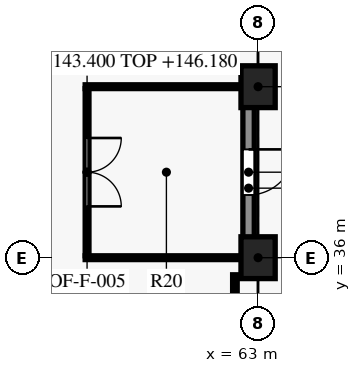
"""IFC4 building model, lengths in metres.
Left out: names, types, materials, properties, quantities, classifications, styles, units other than length and angle.
Written with IfcOpenShell. Run it as: python <this file> out.ifc"""

import sys

from ifc_helpers import new_model, si_unit, direction, frame, frame_2d, origin, origin_2d, place, context, subcontext, project, spatial, rectangle, extrude, element, fill, save


model = new_model("IFC4")
c1 = context("Model", 3, precision=1e-05, world=origin(), true_north=direction((0.0, 1.0)))
c2 = subcontext(c1, "Body", "Model", "MODEL_VIEW")
j1 = project(units=[si_unit("LENGTHUNIT", "METRE"), si_unit("PLANEANGLEUNIT", "RADIAN")], contexts=[c1])
p1 = place(None, origin())
s1 = spatial("IfcSite", under=j1, at=p1, CompositionType="ELEMENT")
p2 = place(p1, origin())
s2 = spatial("IfcBuilding", under=s1, at=p2, CompositionType="ELEMENT")
p3 = place(p2, frame((0.0, 0.0, 143.4)))
s3 = spatial("IfcBuildingStorey", under=s2, at=p3, CompositionType="ELEMENT", Elevation=143.4)
for number, where, z_axis, x_axis in (
    (1, (63.0, 36.0, -0.3), (0.0, 0.0, 1.0), (0.0, 1.0, 0.0)),
    (2, (63.0, 40.5, -0.3), (0.0, 0.0, 1.0), (0.0, 1.0, 0.0)),
):
    element("IfcColumn", number, at=place(p3, frame(where, z_axis=z_axis, x_axis=x_axis)), inside=s3, PredefinedType="COLUMN", context=c2, shape_type="SweptSolid", body=[
        extrude(rectangle(XDim=0.9, YDim=1.1, at=origin_2d()), origin(), (0.0, 0.0, 1.0), 4.1),
    ])
p4 = place(p3, frame((62.75, 40.05, 0.0), z_axis=(0.0, 0.0, 1.0), x_axis=(0.0, -1.0, 0.0)))
e3 = element("IfcWall", 3, at=p4, inside=s3, PredefinedType="SOLIDWALL", context=c2, shape_type="SweptSolid", body=[
    extrude(rectangle(XDim=3.6, YDim=0.3, at=frame_2d((1.8, 0.0))), origin(), (0.0, 0.0, 1.0), 3.15),
])
p5 = place(p4, frame((1.2, 0.0, 0.0)))
e4 = element("IfcOpeningElement", 4, at=p5, cuts=e3, PredefinedType="OPENING", context=c2, shape_type="SweptSolid", body=[
    extrude(rectangle(XDim=1.2, YDim=2.5, at=frame_2d((0.6, 1.25))), frame((0.0, 0.16, 0.0), z_axis=(0.0, -1.0, 0.0), x_axis=(1.0, 0.0, 0.0)), (0.0, 0.0, 1.0), 0.32),
])
p6 = place(p3, frame((62.43, 36.0, 0.0), z_axis=(0.0, 0.0, 1.0), x_axis=(-1.0, 0.0, 0.0)))
e5 = element("IfcWall", 5, at=p6, inside=s3, PredefinedType="PARTITIONING", context=c2, shape_type="SweptSolid", body=[
    extrude(rectangle(XDim=3.98, YDim=0.1, at=frame_2d((1.99, 0.0))), origin(), (0.0, 0.0, 1.0), 3.48),
])
p7 = place(p3, frame((58.5, 40.45, 0.0), z_axis=(0.0, 0.0, 1.0), x_axis=(0.0, -1.0, 0.0)))
e6 = element("IfcWall", 6, at=p7, inside=s3, PredefinedType="PARTITIONING", context=c2, shape_type="SweptSolid", body=[
    extrude(rectangle(XDim=4.4, YDim=0.1, at=frame_2d((2.2, 0.0))), origin(), (0.0, 0.0, 1.0), 2.78),
])
p8 = place(p7, frame((1.3, 0.0, 0.0)))
e7 = element("IfcOpeningElement", 7, at=p8, cuts=e6, PredefinedType="OPENING", context=c2, shape_type="SweptSolid", body=[
    extrude(rectangle(XDim=1.8, YDim=2.1, at=frame_2d((0.9, 1.05))), frame((0.0, 0.06, 0.0), z_axis=(0.0, -1.0, 0.0), x_axis=(1.0, 0.0, 0.0)), (0.0, 0.0, 1.0), 0.12),
])
p9 = place(p3, frame((58.45, 40.5, 0.0), z_axis=(0.0, 0.0, 1.0), x_axis=(1.0, 0.0, 0.0)))
e8 = element("IfcWall", 8, at=p9, inside=s3, PredefinedType="PARTITIONING", context=c2, shape_type="SweptSolid", body=[
    extrude(rectangle(XDim=3.98, YDim=0.1, at=frame_2d((1.99, 0.0))), origin(), (0.0, 0.0, 1.0), 3.48),
])
p10 = place(p5, origin())
e9 = element("IfcDoor", 9, at=p10, inside=s3, OperationType="SINGLE_SWING_RIGHT", PredefinedType="DOOR", context=c2, shape_type="SweptSolid", body=[
    extrude(rectangle(XDim=1.2, YDim=2.5, at=frame_2d((0.6, 1.25))), frame((0.0, 0.025, 0.0), z_axis=(0.0, -1.0, 0.0), x_axis=(1.0, 0.0, 0.0)), (0.0, 0.0, 1.0), 0.05),
])
fill(e4, e9)
p11 = place(p8, origin())
e10 = element("IfcDoor", 10, at=p11, inside=s3, OperationType="DOUBLE_DOOR_SINGLE_SWING", PredefinedType="DOOR", context=c2, shape_type="SweptSolid", body=[
    extrude(rectangle(XDim=1.8, YDim=2.1, at=frame_2d((0.9, 1.05))), frame((0.0, 0.025, 0.0), z_axis=(0.0, -1.0, 0.0), x_axis=(1.0, 0.0, 0.0)), (0.0, 0.0, 1.0), 0.05),
])
fill(e7, e10)
save(model, sys.argv[1])
